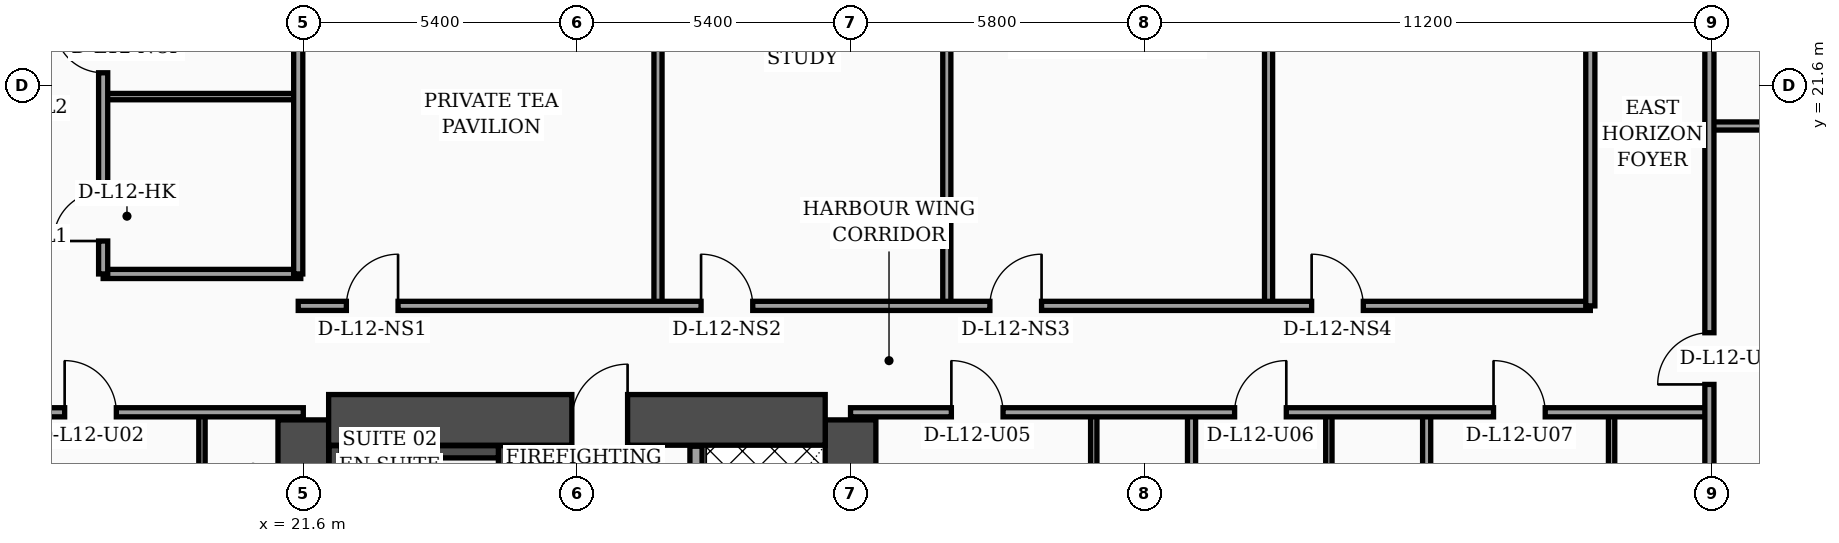
"""IFC4 building model, lengths in metres.
Left out: names, types, materials, properties, quantities, classifications, styles, units other than length and angle.
Written with IfcOpenShell. Run it as: python <this file> out.ifc"""

import sys

from ifc_helpers import new_model, si_unit, direction, frame, frame_2d, origin, place, context, subcontext, project, spatial, rectangle, extrude, element, fill, save


model = new_model("IFC4")
c1 = context("Model", 3, precision=1e-05, world=origin(), true_north=direction((0.0, 1.0)))
c2 = subcontext(c1, "Body", "Model", "MODEL_VIEW")
j1 = project(units=[si_unit("LENGTHUNIT", "METRE"), si_unit("PLANEANGLEUNIT", "RADIAN")], contexts=[c1])
p1 = place(None, origin())
s1 = spatial("IfcSite", under=j1, at=p1, CompositionType="ELEMENT")
p2 = place(p1, origin())
s2 = spatial("IfcBuilding", under=s1, at=p2, CompositionType="ELEMENT")
p3 = place(p2, frame((0.0, 0.0, 54.6)))
s3 = spatial("IfcBuildingStorey", under=s2, at=p3, CompositionType="ELEMENT", Elevation=54.6)
for number, where, z_axis, x_axis in (
    (1, (21.6, 4.6, 0.0), (0.0, 0.0, 1.0), (0.0, 1.0, 0.0)),
    (2, (32.4, 4.6, 0.0), (0.0, 0.0, 1.0), (0.0, 1.0, 0.0)),
):
    element("IfcWall", number, at=place(p3, frame(where, z_axis=z_axis, x_axis=x_axis)), inside=s3, PredefinedType="SHEAR", context=c2, shape_type="SweptSolid", body=[
        extrude(rectangle(XDim=10.4, YDim=1.0, at=frame_2d((5.2, 0.0))), origin(), (0.0, 0.0, 1.0), 3.56),
    ])
p4 = place(p3, frame((22.1, 15.0, 0.0), z_axis=(0.0, 0.0, 1.0), x_axis=(1.0, 0.0, 0.0)))
e3 = element("IfcWall", 3, at=p4, inside=s3, PredefinedType="SHEAR", context=c2, shape_type="SweptSolid", body=[
    extrude(rectangle(XDim=9.8, YDim=1.0, at=frame_2d((4.9, 0.0))), origin(), (0.0, 0.0, 1.0), 3.56),
])
p5 = place(p4, frame((4.8, 0.0, 0.0)))
e4 = element("IfcOpeningElement", 4, at=p5, cuts=e3, PredefinedType="OPENING", context=c2, shape_type="SweptSolid", body=[
    extrude(rectangle(XDim=1.1, YDim=2.2, at=frame_2d((0.55, 1.1))), frame((0.0, 0.51, 0.0), z_axis=(0.0, -1.0, 0.0), x_axis=(1.0, 0.0, 0.0)), (0.0, 0.0, 1.0), 1.02),
])
p6 = place(p3, frame((22.23, 5.1, 0.0), z_axis=(0.0, 0.0, 1.0), x_axis=(0.0, 1.0, 0.0)))
e5 = element("IfcWall", 5, at=p6, inside=s3, PredefinedType="SOLIDWALL", context=c2, shape_type="SweptSolid", body=[
    extrude(rectangle(XDim=9.39, YDim=0.24, at=frame_2d((4.695, 0.0))), origin(), (0.0, 0.0, 1.0), 3.56),
])
p7 = place(p3, frame((25.57, 5.1, 0.0), z_axis=(0.0, 0.0, 1.0), x_axis=(0.0, 1.0, 0.0)))
e6 = element("IfcWall", 6, at=p7, inside=s3, PredefinedType="SOLIDWALL", context=c2, shape_type="SweptSolid", body=[
    extrude(rectangle(XDim=9.39, YDim=0.24, at=frame_2d((4.695, 0.0))), origin(), (0.0, 0.0, 1.0), 3.56),
])
p8 = place(p7, frame((0.35, 0.0, 0.0)))
e7 = element("IfcOpeningElement", 7, at=p8, cuts=e6, PredefinedType="OPENING", context=c2, shape_type="SweptSolid", body=[
    extrude(rectangle(XDim=1.15, YDim=2.2, at=frame_2d((0.575, 1.1))), frame((0.0, 0.13, 0.0), z_axis=(0.0, -1.0, 0.0), x_axis=(1.0, 0.0, 0.0)), (0.0, 0.0, 1.0), 0.26),
])
p9 = place(p3, frame((22.35, 14.37, 0.0), z_axis=(0.0, 0.0, 1.0), x_axis=(1.0, 0.0, 0.0)))
e8 = element("IfcWall", 8, at=p9, inside=s3, PredefinedType="SOLIDWALL", context=c2, shape_type="SweptSolid", body=[
    extrude(rectangle(XDim=3.1, YDim=0.24, at=frame_2d((1.55, 0.0))), origin(), (0.0, 0.0, 1.0), 3.56),
])
p10 = place(p3, frame((29.35, 5.12, 0.0), z_axis=(0.0, 0.0, 1.0), x_axis=(0.0, 1.0, 0.0)))
e9 = element("IfcWall", 9, at=p10, inside=s3, PredefinedType="SOLIDWALL", context=c2, shape_type="SweptSolid", body=[
    extrude(rectangle(XDim=9.36, YDim=0.24, at=frame_2d((4.68, 0.0))), origin(), (0.0, 0.0, 1.0), 3.56),
])
p11 = place(p10, frame((0.55, 0.0, 0.0)))
e10 = element("IfcOpeningElement", 10, at=p11, cuts=e9, PredefinedType="OPENING", context=c2, shape_type="SweptSolid", body=[
    extrude(rectangle(XDim=1.3, YDim=2.35, at=frame_2d((0.65, 1.175))), frame((0.0, 0.13, 0.0), z_axis=(0.0, -1.0, 0.0), x_axis=(1.0, 0.0, 0.0)), (0.0, 0.0, 1.0), 0.26),
])
p12 = place(p3, frame((19.6, 2.44, 0.0), z_axis=(0.0, 0.0, 1.0), x_axis=(0.0, 1.0, 0.0)))
e11 = element("IfcWall", 11, at=p12, inside=s3, PredefinedType="PARTITIONING", context=c2, shape_type="SweptSolid", body=[
    extrude(rectangle(XDim=12.71, YDim=0.125, at=frame_2d((6.355, 0.0))), origin(), (0.0, 0.0, 1.0), 2.34),
])
p13 = place(p12, frame((4.34, 0.0, 0.0)))
e12 = element("IfcOpeningElement", 12, at=p13, cuts=e11, PredefinedType="OPENING", context=c2, shape_type="SweptSolid", body=[
    extrude(rectangle(XDim=0.96, YDim=2.2, at=frame_2d((0.48, 1.1))), frame((0.0, 0.073, 0.0), z_axis=(0.0, -1.0, 0.0), x_axis=(1.0, 0.0, 0.0)), (0.0, 0.0, 1.0), 0.145),
])
p14 = place(p12, frame((10.18, 0.0, 0.0)))
e13 = element("IfcOpeningElement", 13, at=p14, cuts=e11, PredefinedType="OPENING", context=c2, shape_type="SweptSolid", body=[
    extrude(rectangle(XDim=0.9, YDim=2.15, at=frame_2d((0.45, 1.075))), frame((0.0, 0.073, 0.0), z_axis=(0.0, -1.0, 0.0), x_axis=(1.0, 0.0, 0.0)), (0.0, 0.0, 1.0), 0.145),
])
p15 = place(p3, frame((15.15, 15.15, 0.0), z_axis=(0.0, 0.0, 1.0), x_axis=(1.0, 0.0, 0.0)))
e14 = element("IfcWall", 14, at=p15, inside=s3, PredefinedType="PARTITIONING", context=c2, shape_type="SweptSolid", body=[
    extrude(rectangle(XDim=6.45, YDim=0.18, at=frame_2d((3.225, 0.0))), origin(), (0.0, 0.0, 1.0), 2.34),
])
p16 = place(p15, frame((1.74, 0.0, 0.0)))
e15 = element("IfcOpeningElement", 15, at=p16, cuts=e14, PredefinedType="OPENING", context=c2, shape_type="SweptSolid", body=[
    extrude(rectangle(XDim=1.02, YDim=2.2, at=frame_2d((0.51, 1.1))), frame((0.0, 0.1, 0.0), z_axis=(0.0, -1.0, 0.0), x_axis=(1.0, 0.0, 0.0)), (0.0, 0.0, 1.0), 0.2),
])
p17 = place(p3, frame((17.65, 17.88, 0.0), z_axis=(0.0, 0.0, 1.0), x_axis=(1.0, 0.0, 0.0)))
e16 = element("IfcWall", 16, at=p17, inside=s3, PredefinedType="PARTITIONING", context=c2, shape_type="SweptSolid", body=[
    extrude(rectangle(XDim=3.9, YDim=0.18, at=frame_2d((1.95, 0.0))), origin(), (0.0, 0.0, 1.0), 3.09),
])
p18 = place(p3, frame((17.65, 21.38, 0.0), z_axis=(0.0, 0.0, 1.0), x_axis=(1.0, 0.0, 0.0)))
e17 = element("IfcWall", 17, at=p18, inside=s3, PredefinedType="PARTITIONING", context=c2, shape_type="SweptSolid", body=[
    extrude(rectangle(XDim=3.9, YDim=0.125, at=frame_2d((1.95, 0.0))), origin(), (0.0, 0.0, 1.0), 3.56),
])
p19 = place(p3, frame((21.5, 17.88, 0.0), z_axis=(0.0, 0.0, 1.0), x_axis=(0.0, 1.0, 0.0)))
e18 = element("IfcWall", 18, at=p19, inside=s3, PredefinedType="PARTITIONING", context=c2, shape_type="SweptSolid", body=[
    extrude(rectangle(XDim=6.44, YDim=0.18, at=frame_2d((3.22, 0.0))), origin(), (0.0, 0.0, 1.0), 3.09),
])
p20 = place(p3, frame((17.65, 17.88, 0.0), z_axis=(0.0, 0.0, 1.0), x_axis=(0.0, 1.0, 0.0)))
e19 = element("IfcWall", 19, at=p20, inside=s3, PredefinedType="PARTITIONING", context=c2, shape_type="SweptSolid", body=[
    extrude(rectangle(XDim=6.44, YDim=0.18, at=frame_2d((3.22, 0.0))), origin(), (0.0, 0.0, 1.0), 3.09),
])
p21 = place(p20, frame((0.65, 0.0, 0.0)))
e20 = element("IfcOpeningElement", 20, at=p21, cuts=e19, PredefinedType="OPENING", context=c2, shape_type="SweptSolid", body=[
    extrude(rectangle(XDim=0.98, YDim=2.15, at=frame_2d((0.49, 1.075))), frame((0.0, 0.1, 0.0), z_axis=(0.0, -1.0, 0.0), x_axis=(1.0, 0.0, 0.0)), (0.0, 0.0, 1.0), 0.2),
])
p22 = place(p20, frame((3.97, 0.0, 0.0)))
e21 = element("IfcOpeningElement", 21, at=p22, cuts=e19, PredefinedType="OPENING", context=c2, shape_type="SweptSolid", body=[
    extrude(rectangle(XDim=0.96, YDim=2.2, at=frame_2d((0.48, 1.1))), frame((0.0, 0.1, 0.0), z_axis=(0.0, -1.0, 0.0), x_axis=(1.0, 0.0, 0.0)), (0.0, 0.0, 1.0), 0.2),
])
p23 = place(p3, frame((37.2, 2.44, 0.0), z_axis=(0.0, 0.0, 1.0), x_axis=(0.0, 1.0, 0.0)))
e22 = element("IfcWall", 22, at=p23, inside=s3, PredefinedType="PARTITIONING", context=c2, shape_type="SweptSolid", body=[
    extrude(rectangle(XDim=12.71, YDim=0.125, at=frame_2d((6.355, 0.0))), origin(), (0.0, 0.0, 1.0), 2.84),
])
p24 = place(p23, frame((4.35, 0.0, 0.0)))
e23 = element("IfcOpeningElement", 23, at=p24, cuts=e22, PredefinedType="OPENING", context=c2, shape_type="SweptSolid", body=[
    extrude(rectangle(XDim=0.96, YDim=2.2, at=frame_2d((0.48, 1.1))), frame((0.0, 0.073, 0.0), z_axis=(0.0, -1.0, 0.0), x_axis=(1.0, 0.0, 0.0)), (0.0, 0.0, 1.0), 0.145),
])
p25 = place(p23, frame((10.21, 0.0, 0.0)))
e24 = element("IfcOpeningElement", 24, at=p25, cuts=e22, PredefinedType="OPENING", context=c2, shape_type="SweptSolid", body=[
    extrude(rectangle(XDim=0.9, YDim=2.15, at=frame_2d((0.45, 1.075))), frame((0.0, 0.073, 0.0), z_axis=(0.0, -1.0, 0.0), x_axis=(1.0, 0.0, 0.0)), (0.0, 0.0, 1.0), 0.145),
])
p26 = place(p3, frame((41.84, 2.44, 0.0), z_axis=(0.0, 0.0, 1.0), x_axis=(0.0, 1.0, 0.0)))
e25 = element("IfcWall", 25, at=p26, inside=s3, PredefinedType="PARTITIONING", context=c2, shape_type="SweptSolid", body=[
    extrude(rectangle(XDim=12.71, YDim=0.125, at=frame_2d((6.355, 0.0))), origin(), (0.0, 0.0, 1.0), 3.04),
])
p27 = place(p26, frame((4.35, 0.0, 0.0)))
e26 = element("IfcOpeningElement", 26, at=p27, cuts=e25, PredefinedType="OPENING", context=c2, shape_type="SweptSolid", body=[
    extrude(rectangle(XDim=0.96, YDim=2.2, at=frame_2d((0.48, 1.1))), frame((0.0, 0.073, 0.0), z_axis=(0.0, -1.0, 0.0), x_axis=(1.0, 0.0, 0.0)), (0.0, 0.0, 1.0), 0.145),
])
p28 = place(p26, frame((10.21, 0.0, 0.0)))
e27 = element("IfcOpeningElement", 27, at=p28, cuts=e25, PredefinedType="OPENING", context=c2, shape_type="SweptSolid", body=[
    extrude(rectangle(XDim=0.9, YDim=2.15, at=frame_2d((0.45, 1.075))), frame((0.0, 0.073, 0.0), z_axis=(0.0, -1.0, 0.0), x_axis=(1.0, 0.0, 0.0)), (0.0, 0.0, 1.0), 0.145),
])
p29 = place(p3, frame((39.13, 2.44, 0.0), z_axis=(0.0, 0.0, 1.0), x_axis=(0.0, 1.0, 0.0)))
e28 = element("IfcWall", 28, at=p29, inside=s3, PredefinedType="PARTITIONING", context=c2, shape_type="SweptSolid", body=[
    extrude(rectangle(XDim=12.71, YDim=0.16, at=frame_2d((6.355, 0.0))), origin(), (0.0, 0.0, 1.0), 2.84),
])
p30 = place(p3, frame((47.42, 2.44, 0.0), z_axis=(0.0, 0.0, 1.0), x_axis=(0.0, 1.0, 0.0)))
e29 = element("IfcWall", 29, at=p30, inside=s3, PredefinedType="PARTITIONING", context=c2, shape_type="SweptSolid", body=[
    extrude(rectangle(XDim=12.71, YDim=0.125, at=frame_2d((6.355, 0.0))), origin(), (0.0, 0.0, 1.0), 2.84),
])
p31 = place(p30, frame((4.35, 0.0, 0.0)))
e30 = element("IfcOpeningElement", 30, at=p31, cuts=e29, PredefinedType="OPENING", context=c2, shape_type="SweptSolid", body=[
    extrude(rectangle(XDim=0.96, YDim=2.2, at=frame_2d((0.48, 1.1))), frame((0.0, 0.073, 0.0), z_axis=(0.0, -1.0, 0.0), x_axis=(1.0, 0.0, 0.0)), (0.0, 0.0, 1.0), 0.145),
])
p32 = place(p30, frame((10.21, 0.0, 0.0)))
e31 = element("IfcOpeningElement", 31, at=p32, cuts=e29, PredefinedType="OPENING", context=c2, shape_type="SweptSolid", body=[
    extrude(rectangle(XDim=0.9, YDim=2.15, at=frame_2d((0.45, 1.075))), frame((0.0, 0.073, 0.0), z_axis=(0.0, -1.0, 0.0), x_axis=(1.0, 0.0, 0.0)), (0.0, 0.0, 1.0), 0.145),
])
p33 = place(p3, frame((43.77, 2.44, 0.0), z_axis=(0.0, 0.0, 1.0), x_axis=(0.0, 1.0, 0.0)))
e32 = element("IfcWall", 32, at=p33, inside=s3, PredefinedType="PARTITIONING", context=c2, shape_type="SweptSolid", body=[
    extrude(rectangle(XDim=12.71, YDim=0.16, at=frame_2d((6.355, 0.0))), origin(), (0.0, 0.0, 1.0), 3.04),
])
p34 = place(p3, frame((32.4, 15.15, 0.0), z_axis=(0.0, 0.0, 1.0), x_axis=(1.0, 0.0, 0.0)))
e33 = element("IfcWall", 33, at=p34, inside=s3, PredefinedType="PARTITIONING", context=c2, shape_type="SweptSolid", body=[
    extrude(rectangle(XDim=16.95, YDim=0.18, at=frame_2d((8.475, 0.0))), origin(), (0.0, 0.0, 1.0), 2.84),
])
p35 = place(p34, frame((1.99, 0.0, 0.0)))
e34 = element("IfcOpeningElement", 34, at=p35, cuts=e33, PredefinedType="OPENING", context=c2, shape_type="SweptSolid", body=[
    extrude(rectangle(XDim=1.02, YDim=2.2, at=frame_2d((0.51, 1.1))), frame((0.0, 0.1, 0.0), z_axis=(0.0, -1.0, 0.0), x_axis=(1.0, 0.0, 0.0)), (0.0, 0.0, 1.0), 0.2),
])
p36 = place(p34, frame((7.58, 0.0, 0.0)))
e35 = element("IfcOpeningElement", 35, at=p36, cuts=e33, PredefinedType="OPENING", context=c2, shape_type="SweptSolid", body=[
    extrude(rectangle(XDim=1.02, YDim=2.2, at=frame_2d((0.51, 1.1))), frame((0.0, 0.1, 0.0), z_axis=(0.0, -1.0, 0.0), x_axis=(1.0, 0.0, 0.0)), (0.0, 0.0, 1.0), 0.2),
])
p37 = place(p34, frame((12.69, 0.0, 0.0)))
e36 = element("IfcOpeningElement", 36, at=p37, cuts=e33, PredefinedType="OPENING", context=c2, shape_type="SweptSolid", body=[
    extrude(rectangle(XDim=1.02, YDim=2.2, at=frame_2d((0.51, 1.1))), frame((0.0, 0.1, 0.0), z_axis=(0.0, -1.0, 0.0), x_axis=(1.0, 0.0, 0.0)), (0.0, 0.0, 1.0), 0.2),
])
p38 = place(p3, frame((28.6, 17.25, 0.0), z_axis=(0.0, 0.0, 1.0), x_axis=(0.0, 1.0, 0.0)))
e37 = element("IfcWall", 37, at=p38, inside=s3, PredefinedType="PARTITIONING", context=c2, shape_type="SweptSolid", body=[
    extrude(rectangle(XDim=10.54, YDim=0.16, at=frame_2d((5.27, 0.0))), origin(), (0.0, 0.0, 1.0), 2.84),
])
p39 = place(p3, frame((34.3, 17.25, 0.0), z_axis=(0.0, 0.0, 1.0), x_axis=(0.0, 1.0, 0.0)))
e38 = element("IfcWall", 38, at=p39, inside=s3, PredefinedType="PARTITIONING", context=c2, shape_type="SweptSolid", body=[
    extrude(rectangle(XDim=13.23, YDim=0.16, at=frame_2d((6.615, 0.0))), origin(), (0.0, 0.0, 1.0), 2.84),
])
p40 = place(p3, frame((40.65, 17.25, 0.0), z_axis=(0.0, 0.0, 1.0), x_axis=(0.0, 1.0, 0.0)))
e39 = element("IfcWall", 39, at=p40, inside=s3, PredefinedType="PARTITIONING", context=c2, shape_type="SweptSolid", body=[
    extrude(rectangle(XDim=16.23, YDim=0.16, at=frame_2d((8.115, 0.0))), origin(), (0.0, 0.0, 1.0), 2.84),
])
p41 = place(p3, frame((21.5, 17.25, 0.0), z_axis=(0.0, 0.0, 1.0), x_axis=(1.0, 0.0, 0.0)))
e40 = element("IfcWall", 40, at=p41, inside=s3, PredefinedType="PARTITIONING", context=c2, shape_type="SweptSolid", body=[
    extrude(rectangle(XDim=25.5, YDim=0.18, at=frame_2d((12.75, 0.0))), origin(), (0.0, 0.0, 1.0), 2.84),
])
p42 = place(p41, frame((0.95, 0.0, 0.0)))
e41 = element("IfcOpeningElement", 41, at=p42, cuts=e40, PredefinedType="OPENING", context=c2, shape_type="SweptSolid", body=[
    extrude(rectangle(XDim=1.02, YDim=2.2, at=frame_2d((0.51, 1.1))), frame((0.0, 0.1, 0.0), z_axis=(0.0, -1.0, 0.0), x_axis=(1.0, 0.0, 0.0)), (0.0, 0.0, 1.0), 0.2),
])
p43 = place(p41, frame((7.95, 0.0, 0.0)))
e42 = element("IfcOpeningElement", 42, at=p43, cuts=e40, PredefinedType="OPENING", context=c2, shape_type="SweptSolid", body=[
    extrude(rectangle(XDim=1.02, YDim=2.2, at=frame_2d((0.51, 1.1))), frame((0.0, 0.1, 0.0), z_axis=(0.0, -1.0, 0.0), x_axis=(1.0, 0.0, 0.0)), (0.0, 0.0, 1.0), 0.2),
])
p44 = place(p41, frame((13.65, 0.0, 0.0)))
e43 = element("IfcOpeningElement", 43, at=p44, cuts=e40, PredefinedType="OPENING", context=c2, shape_type="SweptSolid", body=[
    extrude(rectangle(XDim=1.02, YDim=2.2, at=frame_2d((0.51, 1.1))), frame((0.0, 0.1, 0.0), z_axis=(0.0, -1.0, 0.0), x_axis=(1.0, 0.0, 0.0)), (0.0, 0.0, 1.0), 0.2),
])
p45 = place(p41, frame((20.0, 0.0, 0.0)))
e44 = element("IfcOpeningElement", 44, at=p45, cuts=e40, PredefinedType="OPENING", context=c2, shape_type="SweptSolid", body=[
    extrude(rectangle(XDim=1.02, YDim=2.2, at=frame_2d((0.51, 1.1))), frame((0.0, 0.1, 0.0), z_axis=(0.0, -1.0, 0.0), x_axis=(1.0, 0.0, 0.0)), (0.0, 0.0, 1.0), 0.2),
])
p46 = place(p3, frame((47.0, 17.25, 0.0), z_axis=(0.0, 0.0, 1.0), x_axis=(0.0, 1.0, 0.0)))
e45 = element("IfcWall", 45, at=p46, inside=s3, PredefinedType="PARTITIONING", context=c2, shape_type="SweptSolid", body=[
    extrude(rectangle(XDim=19.22, YDim=0.18, at=frame_2d((9.61, 0.0))), origin(), (0.0, 0.0, 1.0), 2.84),
])
p47 = place(p3, frame((49.35, 20.8, 0.0), z_axis=(0.0, 0.0, 1.0), x_axis=(1.0, 0.0, 0.0)))
e46 = element("IfcWall", 46, at=p47, inside=s3, PredefinedType="PARTITIONING", context=c2, shape_type="SweptSolid", body=[
    extrude(rectangle(XDim=9.4, YDim=0.16, at=frame_2d((4.7, 0.0))), origin(), (0.0, 0.0, 1.0), 3.04),
])
p48 = place(p3, frame((49.35, 2.44, 0.0), z_axis=(0.0, 0.0, 1.0), x_axis=(0.0, 1.0, 0.0)))
e47 = element("IfcWall", 47, at=p48, inside=s3, PredefinedType="PARTITIONING", context=c2, shape_type="SweptSolid", body=[
    extrude(rectangle(XDim=27.84, YDim=0.18, at=frame_2d((13.92, 0.0))), origin(), (0.0, 0.0, 1.0), 2.84),
])
p49 = place(p48, frame((13.26, 0.0, 0.0)))
e48 = element("IfcOpeningElement", 48, at=p49, cuts=e47, PredefinedType="OPENING", context=c2, shape_type="SweptSolid", body=[
    extrude(rectangle(XDim=1.02, YDim=2.2, at=frame_2d((0.51, 1.1))), frame((0.0, 0.1, 0.0), z_axis=(0.0, -1.0, 0.0), x_axis=(1.0, 0.0, 0.0)), (0.0, 0.0, 1.0), 0.2),
])
p50 = place(p48, frame((21.52, 0.0, 0.0)))
e49 = element("IfcOpeningElement", 49, at=p50, cuts=e47, PredefinedType="OPENING", context=c2, shape_type="SweptSolid", body=[
    extrude(rectangle(XDim=1.02, YDim=2.2, at=frame_2d((0.51, 1.1))), frame((0.0, 0.1, 0.0), z_axis=(0.0, -1.0, 0.0), x_axis=(1.0, 0.0, 0.0)), (0.0, 0.0, 1.0), 0.2),
])
p51 = place(p16, origin())
e50 = element("IfcDoor", 50, at=p51, inside=s3, OperationType="SINGLE_SWING_LEFT", PredefinedType="DOOR", context=c2, shape_type="SweptSolid", body=[
    extrude(rectangle(XDim=1.02, YDim=2.2, at=frame_2d((0.51, 1.1))), frame((0.0, 0.025, 0.0), z_axis=(0.0, -1.0, 0.0), x_axis=(1.0, 0.0, 0.0)), (0.0, 0.0, 1.0), 0.05),
])
fill(e15, e50)
p52 = place(p21, origin())
e51 = element("IfcDoor", 51, at=p52, inside=s3, OperationType="SINGLE_SWING_LEFT", PredefinedType="DOOR", context=c2, shape_type="SweptSolid", body=[
    extrude(rectangle(XDim=0.98, YDim=2.15, at=frame_2d((0.49, 1.075))), frame((0.0, 0.025, 0.0), z_axis=(0.0, -1.0, 0.0), x_axis=(1.0, 0.0, 0.0)), (0.0, 0.0, 1.0), 0.05),
])
fill(e20, e51)
p53 = place(p22, origin())
e52 = element("IfcDoor", 52, at=p53, inside=s3, OperationType="SINGLE_SWING_RIGHT", PredefinedType="DOOR", context=c2, shape_type="SweptSolid", body=[
    extrude(rectangle(XDim=0.96, YDim=2.2, at=frame_2d((0.48, 1.1))), frame((0.0, 0.025, 0.0), z_axis=(0.0, -1.0, 0.0), x_axis=(1.0, 0.0, 0.0)), (0.0, 0.0, 1.0), 0.05),
])
fill(e21, e52)
p54 = place(p35, origin())
e53 = element("IfcDoor", 53, at=p54, inside=s3, OperationType="SINGLE_SWING_LEFT", PredefinedType="DOOR", context=c2, shape_type="SweptSolid", body=[
    extrude(rectangle(XDim=1.02, YDim=2.2, at=frame_2d((0.51, 1.1))), frame((0.0, 0.025, 0.0), z_axis=(0.0, -1.0, 0.0), x_axis=(1.0, 0.0, 0.0)), (0.0, 0.0, 1.0), 0.05),
])
fill(e34, e53)
p55 = place(p36, origin())
e54 = element("IfcDoor", 54, at=p55, inside=s3, OperationType="SINGLE_SWING_RIGHT", PredefinedType="DOOR", context=c2, shape_type="SweptSolid", body=[
    extrude(rectangle(XDim=1.02, YDim=2.2, at=frame_2d((0.51, 1.1))), frame((0.0, 0.025, 0.0), z_axis=(0.0, -1.0, 0.0), x_axis=(1.0, 0.0, 0.0)), (0.0, 0.0, 1.0), 0.05),
])
fill(e35, e54)
p56 = place(p37, origin())
e55 = element("IfcDoor", 55, at=p56, inside=s3, OperationType="SINGLE_SWING_LEFT", PredefinedType="DOOR", context=c2, shape_type="SweptSolid", body=[
    extrude(rectangle(XDim=1.02, YDim=2.2, at=frame_2d((0.51, 1.1))), frame((0.0, 0.025, 0.0), z_axis=(0.0, -1.0, 0.0), x_axis=(1.0, 0.0, 0.0)), (0.0, 0.0, 1.0), 0.05),
])
fill(e36, e55)
p57 = place(p42, origin())
e56 = element("IfcDoor", 56, at=p57, inside=s3, OperationType="SINGLE_SWING_RIGHT", PredefinedType="DOOR", context=c2, shape_type="SweptSolid", body=[
    extrude(rectangle(XDim=1.02, YDim=2.2, at=frame_2d((0.51, 1.1))), frame((0.0, 0.025, 0.0), z_axis=(0.0, -1.0, 0.0), x_axis=(1.0, 0.0, 0.0)), (0.0, 0.0, 1.0), 0.05),
])
fill(e41, e56)
p58 = place(p43, origin())
e57 = element("IfcDoor", 57, at=p58, inside=s3, OperationType="SINGLE_SWING_LEFT", PredefinedType="DOOR", context=c2, shape_type="SweptSolid", body=[
    extrude(rectangle(XDim=1.02, YDim=2.2, at=frame_2d((0.51, 1.1))), frame((0.0, 0.025, 0.0), z_axis=(0.0, -1.0, 0.0), x_axis=(1.0, 0.0, 0.0)), (0.0, 0.0, 1.0), 0.05),
])
fill(e42, e57)
p59 = place(p44, origin())
e58 = element("IfcDoor", 58, at=p59, inside=s3, OperationType="SINGLE_SWING_RIGHT", PredefinedType="DOOR", context=c2, shape_type="SweptSolid", body=[
    extrude(rectangle(XDim=1.02, YDim=2.2, at=frame_2d((0.51, 1.1))), frame((0.0, 0.025, 0.0), z_axis=(0.0, -1.0, 0.0), x_axis=(1.0, 0.0, 0.0)), (0.0, 0.0, 1.0), 0.05),
])
fill(e43, e58)
p60 = place(p45, origin())
e59 = element("IfcDoor", 59, at=p60, inside=s3, OperationType="SINGLE_SWING_LEFT", PredefinedType="DOOR", context=c2, shape_type="SweptSolid", body=[
    extrude(rectangle(XDim=1.02, YDim=2.2, at=frame_2d((0.51, 1.1))), frame((0.0, 0.025, 0.0), z_axis=(0.0, -1.0, 0.0), x_axis=(1.0, 0.0, 0.0)), (0.0, 0.0, 1.0), 0.05),
])
fill(e44, e59)
p61 = place(p49, origin())
e60 = element("IfcDoor", 60, at=p61, inside=s3, OperationType="SINGLE_SWING_LEFT", PredefinedType="DOOR", context=c2, shape_type="SweptSolid", body=[
    extrude(rectangle(XDim=1.02, YDim=2.2, at=frame_2d((0.51, 1.1))), frame((0.0, 0.025, 0.0), z_axis=(0.0, -1.0, 0.0), x_axis=(1.0, 0.0, 0.0)), (0.0, 0.0, 1.0), 0.05),
])
fill(e48, e60)
p62 = place(p5, origin())
e61 = element("IfcDoor", 61, at=p62, inside=s3, OperationType="SINGLE_SWING_RIGHT", PredefinedType="DOOR", context=c2, shape_type="SweptSolid", body=[
    extrude(rectangle(XDim=1.1, YDim=2.2, at=frame_2d((0.55, 1.1))), frame((0.0, 0.025, 0.0), z_axis=(0.0, -1.0, 0.0), x_axis=(1.0, 0.0, 0.0)), (0.0, 0.0, 1.0), 0.05),
])
fill(e4, e61)
save(model, sys.argv[1])
